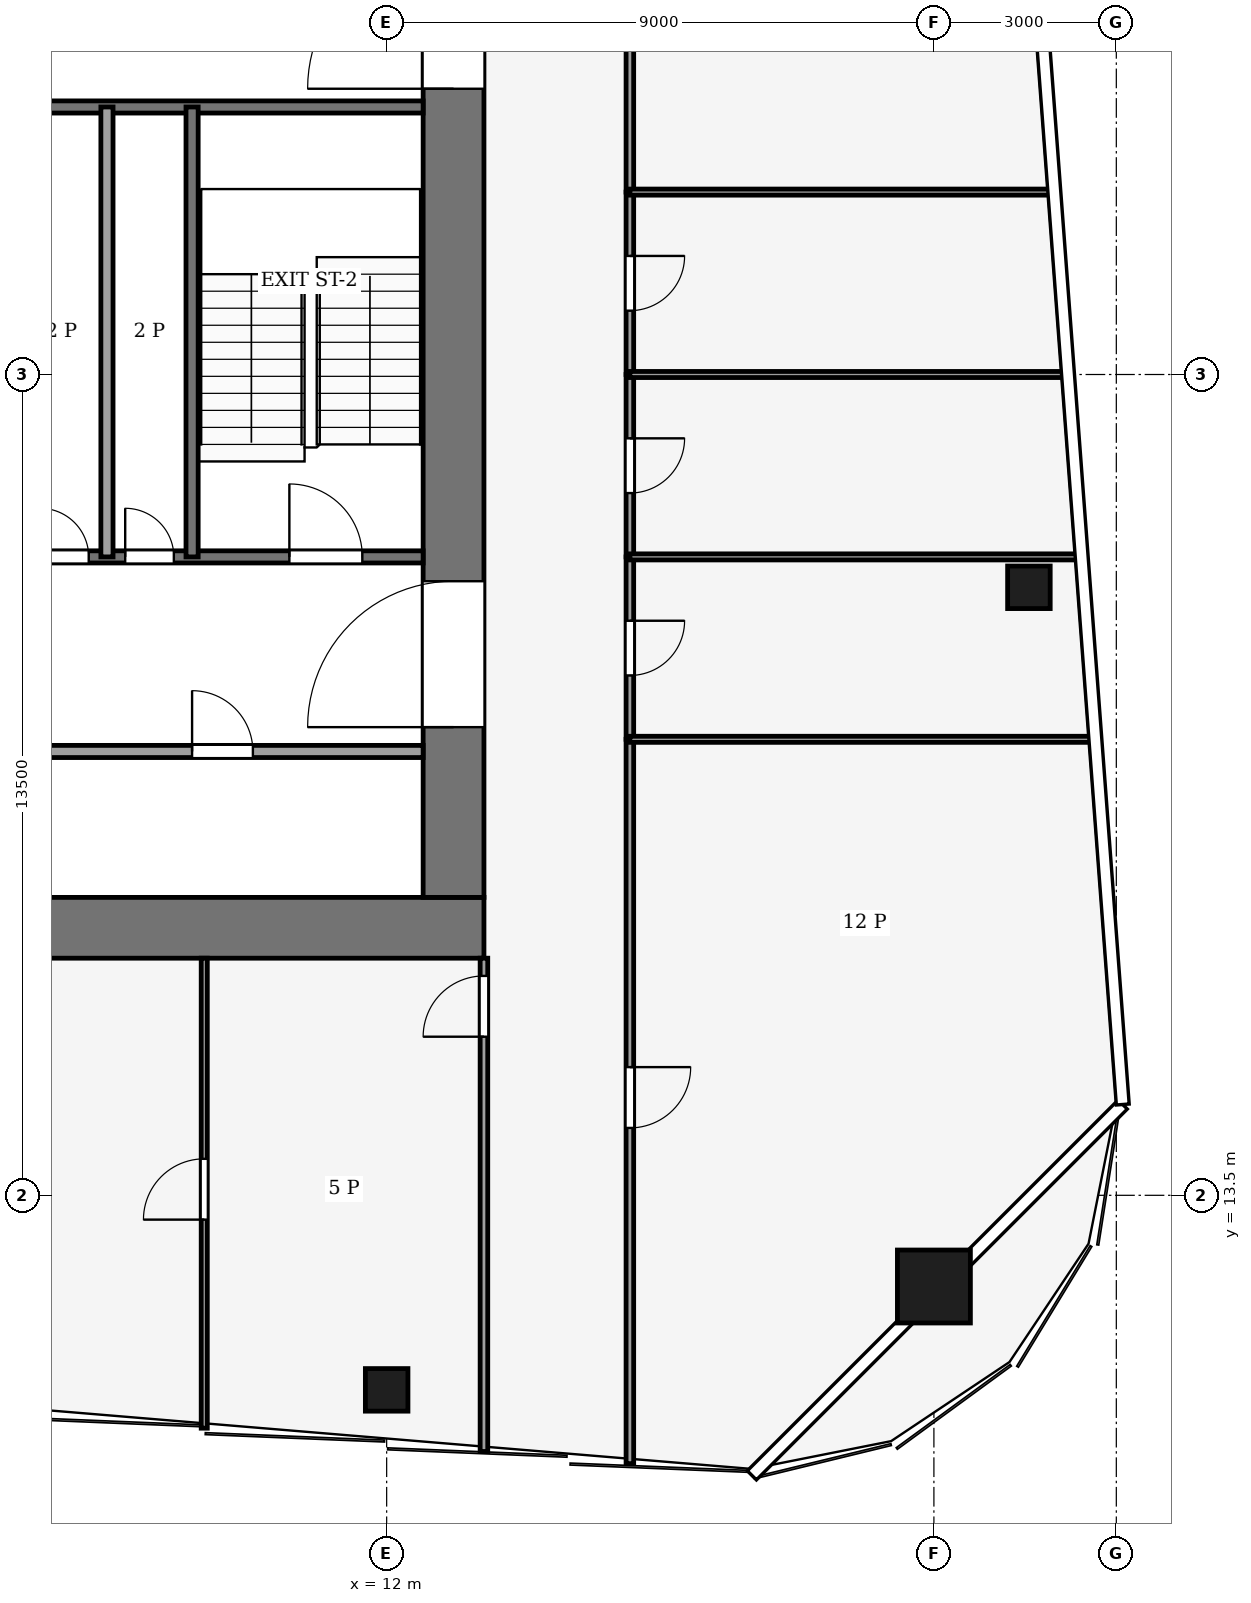
"""IFC4 building model, lengths in metres.
Left out: names, types, materials, properties, quantities, classifications, styles, units other than length and angle.
Written with IfcOpenShell. Run it as: python <this file> out.ifc"""

import sys

from ifc_helpers import new_model, si_unit, direction, frame, frame_2d, origin, origin_2d, place, context, subcontext, project, spatial, rectangle, hollow_rectangle, extrude, element, fill, save


model = new_model("IFC4")
c1 = context("Model", 3, precision=1e-05, world=origin(), true_north=direction((0.0, 1.0)))
c2 = subcontext(c1, "Body", "Model", "MODEL_VIEW")
j1 = project(units=[si_unit("LENGTHUNIT", "METRE"), si_unit("PLANEANGLEUNIT", "RADIAN")], contexts=[c1])
p1 = place(None, origin())
s1 = spatial("IfcSite", under=j1, at=p1, CompositionType="ELEMENT")
p2 = place(p1, origin())
s2 = spatial("IfcBuilding", under=s1, at=p2, CompositionType="ELEMENT")
p3 = place(p2, frame((0.0, 0.0, 146.0)))
s3 = spatial("IfcBuildingStorey", under=s2, at=p3, CompositionType="ELEMENT", Elevation=146.0)
p4 = place(p3, frame((-13.6, 17.9, -0.13), z_axis=(0.0, 0.0, 1.0), x_axis=(1.0, 0.0, 0.0)))
e1 = element("IfcWall", 1, at=p4, inside=s3, PredefinedType="SHEAR", context=c2, shape_type="SweptSolid", body=[
    extrude(rectangle(XDim=27.2, YDim=1.0, at=frame_2d((13.6, 0.0))), origin(), (0.0, 0.0, 1.0), 4.0),
])
p5 = place(p3, frame((13.1, 18.4, -0.13), z_axis=(0.0, 0.0, 1.0), x_axis=(0.0, 1.0, 0.0)))
e2 = element("IfcWall", 2, at=p5, inside=s3, PredefinedType="SHEAR", context=c2, shape_type="SweptSolid", body=[
    extrude(rectangle(XDim=19.2, YDim=1.0, at=frame_2d((9.6, 0.0))), origin(), (0.0, 0.0, 1.0), 4.0),
])
p6 = place(p5, frame((2.8, 0.0, 0.13)))
e3 = element("IfcOpeningElement", 3, at=p6, cuts=e2, PredefinedType="OPENING", context=c2, shape_type="SweptSolid", body=[
    extrude(rectangle(XDim=2.4, YDim=2.4, at=frame_2d((1.2, 1.2))), frame((0.0, 0.51, 0.0), z_axis=(0.0, -1.0, 0.0), x_axis=(1.0, 0.0, 0.0)), (0.0, 0.0, 1.0), 1.02),
])
p7 = place(p5, frame((13.3, 0.0, 0.13)))
e4 = element("IfcOpeningElement", 4, at=p7, cuts=e2, PredefinedType="OPENING", context=c2, shape_type="SweptSolid", body=[
    extrude(rectangle(XDim=2.4, YDim=2.4, at=frame_2d((1.2, 1.2))), frame((0.0, 0.51, 0.0), z_axis=(0.0, -1.0, 0.0), x_axis=(1.0, 0.0, 0.0)), (0.0, 0.0, 1.0), 1.02),
])
p8 = place(p3, frame((21.0, 12.0, 0.0), z_axis=(0.0, 0.0, 1.0), x_axis=(1.0, 0.0, 0.0)))
e5 = element("IfcColumn", 5, at=p8, inside=s3, PredefinedType="COLUMN", context=c2, shape_type="SweptSolid", body=[
    extrude(hollow_rectangle(XDim=1.2, YDim=1.2, WallThickness=0.07, at=origin_2d()), origin(), (0.0, 0.0, 1.0), 4.0),
])
for number, where, z_axis, x_axis in (
    (6, (12.0, 10.3, 0.0), (0.0, 0.0, 1.0), (1.0, 0.0, 0.0)),
    (7, (22.562, 23.5, 0.0), (0.0, 0.0, 1.0), (1.0, 0.0, 0.0)),
):
    element("IfcColumn", number, at=place(p3, frame(where, z_axis=z_axis, x_axis=x_axis)), inside=s3, PredefinedType="COLUMN", context=c2, shape_type="SweptSolid", body=[
        extrude(hollow_rectangle(XDim=0.7, YDim=0.7, WallThickness=0.03, at=origin_2d()), origin(), (0.0, 0.0, 1.0), 4.0),
    ])
p9 = place(p3, frame((6.0, 20.8, 0.0), z_axis=(0.0, 0.0, 1.0), x_axis=(1.0, 0.0, 0.0)))
e8 = element("IfcWall", 8, at=p9, inside=s3, PredefinedType="PARTITIONING", context=c2, shape_type="SweptSolid", body=[
    extrude(rectangle(XDim=6.6, YDim=0.2, at=frame_2d((3.3, 0.0))), origin(), (0.0, 0.0, 1.0), 3.87),
])
p10 = place(p9, frame((2.8, 0.0, 0.0)))
e9 = element("IfcOpeningElement", 9, at=p10, cuts=e8, PredefinedType="OPENING", context=c2, shape_type="SweptSolid", body=[
    extrude(rectangle(XDim=1.0, YDim=2.1, at=frame_2d((0.5, 1.05))), frame((0.0, 0.11, 0.0), z_axis=(0.0, -1.0, 0.0), x_axis=(1.0, 0.0, 0.0)), (0.0, 0.0, 1.0), 0.22),
])
p11 = place(p3, frame((6.0, 24.0, 0.0), z_axis=(0.0, 0.0, 1.0), x_axis=(1.0, 0.0, 0.0)))
e10 = element("IfcWall", 10, at=p11, inside=s3, PredefinedType="PARTITIONING", context=c2, shape_type="SweptSolid", body=[
    extrude(rectangle(XDim=6.6, YDim=0.2, at=frame_2d((3.3, 0.0))), origin(), (0.0, 0.0, 1.0), 3.87),
])
p12 = place(p11, frame((0.3, 0.0, 0.0)))
e11 = element("IfcOpeningElement", 11, at=p12, cuts=e10, PredefinedType="OPENING", context=c2, shape_type="SweptSolid", body=[
    extrude(rectangle(XDim=0.8, YDim=2.1, at=frame_2d((0.4, 1.05))), frame((0.0, 0.11, 0.0), z_axis=(0.0, -1.0, 0.0), x_axis=(1.0, 0.0, 0.0)), (0.0, 0.0, 1.0), 0.22),
])
p13 = place(p11, frame((1.7, 0.0, 0.0)))
e12 = element("IfcOpeningElement", 12, at=p13, cuts=e10, PredefinedType="OPENING", context=c2, shape_type="SweptSolid", body=[
    extrude(rectangle(XDim=0.8, YDim=2.1, at=frame_2d((0.4, 1.05))), frame((0.0, 0.11, 0.0), z_axis=(0.0, -1.0, 0.0), x_axis=(1.0, 0.0, 0.0)), (0.0, 0.0, 1.0), 0.22),
])
p14 = place(p11, frame((4.4, 0.0, 0.0)))
e13 = element("IfcOpeningElement", 13, at=p14, cuts=e10, PredefinedType="OPENING", context=c2, shape_type="SweptSolid", body=[
    extrude(rectangle(XDim=1.2, YDim=2.2, at=frame_2d((0.6, 1.1))), frame((0.0, 0.11, 0.0), z_axis=(0.0, -1.0, 0.0), x_axis=(1.0, 0.0, 0.0)), (0.0, 0.0, 1.0), 0.22),
])
p15 = place(p3, frame((6.0, 31.4, 0.0), z_axis=(0.0, 0.0, 1.0), x_axis=(1.0, 0.0, 0.0)))
e14 = element("IfcWall", 14, at=p15, inside=s3, PredefinedType="PARTITIONING", context=c2, shape_type="SweptSolid", body=[
    extrude(rectangle(XDim=6.6, YDim=0.2, at=frame_2d((3.3, 0.0))), origin(), (0.0, 0.0, 1.0), 3.87),
])
for number, where, z_axis, x_axis in (
    (15, (7.4, 24.0, 0.0), (0.0, 0.0, 1.0), (0.0, 1.0, 0.0)),
    (16, (8.8, 24.0, 0.0), (0.0, 0.0, 1.0), (0.0, 1.0, 0.0)),
):
    element("IfcWall", number, at=place(p3, frame(where, z_axis=z_axis, x_axis=x_axis)), inside=s3, PredefinedType="PARTITIONING", context=c2, shape_type="SweptSolid", body=[
        extrude(rectangle(XDim=7.4, YDim=0.2, at=frame_2d((3.7, 0.0))), origin(), (0.0, 0.0, 1.0), 3.87),
    ])
p16 = place(p3, frame((16.0, 21.0, 0.0), z_axis=(0.0, 0.0, 1.0), x_axis=(0.0, -1.0, 0.0)))
e17 = element("IfcWall", 17, at=p16, inside=s3, PredefinedType="PARTITIONING", context=c2, shape_type="SweptSolid", body=[
    extrude(rectangle(XDim=11.913, YDim=0.125, at=frame_2d((5.957, 0.0))), origin(), (0.0, 0.0, 1.0), 3.04),
])
p17 = place(p16, frame((5.392, 0.0, 0.0)))
e18 = element("IfcOpeningElement", 18, at=p17, cuts=e17, PredefinedType="OPENING", context=c2, shape_type="SweptSolid", body=[
    extrude(rectangle(XDim=1.0, YDim=2.1, at=frame_2d((0.5, 1.05))), frame((0.0, 0.073, 0.0), z_axis=(0.0, -1.0, 0.0), x_axis=(1.0, 0.0, 0.0)), (0.0, 0.0, 1.0), 0.145),
])
p18 = place(p3, frame((16.0, 24.0, 0.0), z_axis=(0.0, 0.0, 1.0), x_axis=(0.0, -1.0, 0.0)))
e19 = element("IfcWall", 19, at=p18, inside=s3, PredefinedType="PARTITIONING", context=c2, shape_type="SweptSolid", body=[
    extrude(rectangle(XDim=3.0, YDim=0.125, at=frame_2d((1.5, 0.0))), origin(), (0.0, 0.0, 1.0), 3.48),
])
p19 = place(p18, frame((1.05, 0.0, 0.0)))
e20 = element("IfcOpeningElement", 20, at=p19, cuts=e19, PredefinedType="OPENING", context=c2, shape_type="SweptSolid", body=[
    extrude(rectangle(XDim=0.9, YDim=2.1, at=frame_2d((0.45, 1.05))), frame((0.0, 0.073, 0.0), z_axis=(0.0, -1.0, 0.0), x_axis=(1.0, 0.0, 0.0)), (0.0, 0.0, 1.0), 0.145),
])
p20 = place(p3, frame((16.0, 27.0, 0.0), z_axis=(0.0, 0.0, 1.0), x_axis=(0.0, -1.0, 0.0)))
e21 = element("IfcWall", 21, at=p20, inside=s3, PredefinedType="PARTITIONING", context=c2, shape_type="SweptSolid", body=[
    extrude(rectangle(XDim=3.0, YDim=0.125, at=frame_2d((1.5, 0.0))), origin(), (0.0, 0.0, 1.0), 3.87),
])
p21 = place(p20, frame((1.05, 0.0, 0.0)))
e22 = element("IfcOpeningElement", 22, at=p21, cuts=e21, PredefinedType="OPENING", context=c2, shape_type="SweptSolid", body=[
    extrude(rectangle(XDim=0.9, YDim=2.1, at=frame_2d((0.45, 1.05))), frame((0.0, 0.073, 0.0), z_axis=(0.0, -1.0, 0.0), x_axis=(1.0, 0.0, 0.0)), (0.0, 0.0, 1.0), 0.145),
])
p22 = place(p3, frame((16.0, 30.0, 0.0), z_axis=(0.0, 0.0, 1.0), x_axis=(0.0, -1.0, 0.0)))
e23 = element("IfcWall", 23, at=p22, inside=s3, PredefinedType="PARTITIONING", context=c2, shape_type="SweptSolid", body=[
    extrude(rectangle(XDim=3.0, YDim=0.125, at=frame_2d((1.5, 0.0))), origin(), (0.0, 0.0, 1.0), 3.48),
])
p23 = place(p22, frame((1.05, 0.0, 0.0)))
e24 = element("IfcOpeningElement", 24, at=p23, cuts=e23, PredefinedType="OPENING", context=c2, shape_type="SweptSolid", body=[
    extrude(rectangle(XDim=0.9, YDim=2.1, at=frame_2d((0.45, 1.05))), frame((0.0, 0.073, 0.0), z_axis=(0.0, -1.0, 0.0), x_axis=(1.0, 0.0, 0.0)), (0.0, 0.0, 1.0), 0.145),
])
p24 = place(p3, frame((16.0, 41.004, 0.0), z_axis=(0.0, 0.0, 1.0), x_axis=(0.0, -1.0, 0.0)))
e25 = element("IfcWall", 25, at=p24, inside=s3, PredefinedType="PARTITIONING", context=c2, shape_type="SweptSolid", body=[
    extrude(rectangle(XDim=11.004, YDim=0.125, at=frame_2d((5.502, 0.0))), origin(), (0.0, 0.0, 1.0), 3.14),
])
p25 = place(p24, frame((5.002, 0.0, 0.0)))
e26 = element("IfcOpeningElement", 26, at=p25, cuts=e25, PredefinedType="OPENING", context=c2, shape_type="SweptSolid", body=[
    extrude(rectangle(XDim=1.0, YDim=2.1, at=frame_2d((0.5, 1.05))), frame((0.0, 0.073, 0.0), z_axis=(0.0, -1.0, 0.0), x_axis=(1.0, 0.0, 0.0)), (0.0, 0.0, 1.0), 0.145),
])
p26 = place(p3, frame((13.6, 9.287, 0.0), z_axis=(0.0, 0.0, 1.0), x_axis=(0.0, 1.0, 0.0)))
e27 = element("IfcWall", 27, at=p26, inside=s3, PredefinedType="PARTITIONING", context=c2, shape_type="SweptSolid", body=[
    extrude(rectangle(XDim=8.113, YDim=0.125, at=frame_2d((4.057, 0.0))), origin(), (0.0, 0.0, 1.0), 3.04),
])
p27 = place(p26, frame((6.822, 0.0, 0.0)))
e28 = element("IfcOpeningElement", 28, at=p27, cuts=e27, PredefinedType="OPENING", context=c2, shape_type="SweptSolid", body=[
    extrude(rectangle(XDim=1.0, YDim=2.1, at=frame_2d((0.5, 1.05))), frame((0.0, 0.073, 0.0), z_axis=(0.0, -1.0, 0.0), x_axis=(1.0, 0.0, 0.0)), (0.0, 0.0, 1.0), 0.145),
])
p28 = place(p3, frame((23.63, 21.0, 0.0), z_axis=(0.0, 0.0, 1.0), x_axis=(-1.0, 0.0, 0.0)))
e29 = element("IfcWall", 29, at=p28, inside=s3, PredefinedType="PARTITIONING", context=c2, shape_type="SweptSolid", body=[
    extrude(rectangle(XDim=7.63, YDim=0.1, at=frame_2d((3.815, 0.0))), origin(), (0.0, 0.0, 1.0), 3.04),
])
p29 = place(p3, frame((23.405, 24.0, 0.0), z_axis=(0.0, 0.0, 1.0), x_axis=(-1.0, 0.0, 0.0)))
e30 = element("IfcWall", 30, at=p29, inside=s3, PredefinedType="PARTITIONING", context=c2, shape_type="SweptSolid", body=[
    extrude(rectangle(XDim=7.405, YDim=0.1, at=frame_2d((3.703, 0.0))), origin(), (0.0, 0.0, 1.0), 3.04),
])
p30 = place(p3, frame((23.18, 27.0, 0.0), z_axis=(0.0, 0.0, 1.0), x_axis=(-1.0, 0.0, 0.0)))
e31 = element("IfcWall", 31, at=p30, inside=s3, PredefinedType="PARTITIONING", context=c2, shape_type="SweptSolid", body=[
    extrude(rectangle(XDim=7.18, YDim=0.1, at=frame_2d((3.59, 0.0))), origin(), (0.0, 0.0, 1.0), 3.04),
])
p31 = place(p3, frame((22.955, 30.0, 0.0), z_axis=(0.0, 0.0, 1.0), x_axis=(-1.0, 0.0, 0.0)))
e32 = element("IfcWall", 32, at=p31, inside=s3, PredefinedType="PARTITIONING", context=c2, shape_type="SweptSolid", body=[
    extrude(rectangle(XDim=6.955, YDim=0.1, at=frame_2d((3.478, 0.0))), origin(), (0.0, 0.0, 1.0), 3.04),
])
p32 = place(p3, frame((9.0, 9.67, 0.0), z_axis=(0.0, 0.0, 1.0), x_axis=(0.0, 1.0, 0.0)))
e33 = element("IfcWall", 33, at=p32, inside=s3, PredefinedType="PARTITIONING", context=c2, shape_type="SweptSolid", body=[
    extrude(rectangle(XDim=7.73, YDim=0.1, at=frame_2d((3.865, 0.0))), origin(), (0.0, 0.0, 1.0), 3.04),
])
p33 = place(p32, frame((3.43, 0.0, 0.0)))
e34 = element("IfcOpeningElement", 34, at=p33, cuts=e33, PredefinedType="OPENING", context=c2, shape_type="SweptSolid", body=[
    extrude(rectangle(XDim=1.0, YDim=2.1, at=frame_2d((0.5, 1.05))), frame((0.0, 0.06, 0.0), z_axis=(0.0, -1.0, 0.0), x_axis=(1.0, 0.0, 0.0)), (0.0, 0.0, 1.0), 0.12),
])
p34 = place(p10, origin())
e35 = element("IfcDoor", 35, at=p34, inside=s3, OperationType="SINGLE_SWING_LEFT", PredefinedType="DOOR", context=c2, shape_type="SweptSolid", body=[
    extrude(rectangle(XDim=1.0, YDim=2.1, at=frame_2d((0.5, 1.05))), frame((0.0, 0.025, 0.0), z_axis=(0.0, -1.0, 0.0), x_axis=(1.0, 0.0, 0.0)), (0.0, 0.0, 1.0), 0.05),
])
fill(e9, e35)
p35 = place(p12, origin())
e36 = element("IfcDoor", 36, at=p35, inside=s3, OperationType="SINGLE_SWING_RIGHT", PredefinedType="DOOR", context=c2, shape_type="SweptSolid", body=[
    extrude(rectangle(XDim=0.8, YDim=2.1, at=frame_2d((0.4, 1.05))), frame((0.0, 0.025, 0.0), z_axis=(0.0, -1.0, 0.0), x_axis=(1.0, 0.0, 0.0)), (0.0, 0.0, 1.0), 0.05),
])
fill(e11, e36)
p36 = place(p13, origin())
e37 = element("IfcDoor", 37, at=p36, inside=s3, OperationType="SINGLE_SWING_LEFT", PredefinedType="DOOR", context=c2, shape_type="SweptSolid", body=[
    extrude(rectangle(XDim=0.8, YDim=2.1, at=frame_2d((0.4, 1.05))), frame((0.0, 0.025, 0.0), z_axis=(0.0, -1.0, 0.0), x_axis=(1.0, 0.0, 0.0)), (0.0, 0.0, 1.0), 0.05),
])
fill(e12, e37)
p37 = place(p14, origin())
e38 = element("IfcDoor", 38, at=p37, inside=s3, OperationType="SINGLE_SWING_LEFT", PredefinedType="DOOR", context=c2, shape_type="SweptSolid", body=[
    extrude(rectangle(XDim=1.2, YDim=2.2, at=frame_2d((0.6, 1.1))), frame((0.0, 0.025, 0.0), z_axis=(0.0, -1.0, 0.0), x_axis=(1.0, 0.0, 0.0)), (0.0, 0.0, 1.0), 0.05),
])
fill(e13, e38)
p38 = place(p6, origin())
e39 = element("IfcDoor", 39, at=p38, inside=s3, OperationType="DOUBLE_DOOR_SINGLE_SWING", PredefinedType="DOOR", context=c2, shape_type="SweptSolid", body=[
    extrude(rectangle(XDim=2.4, YDim=2.4, at=frame_2d((1.2, 1.2))), frame((0.0, 0.025, 0.0), z_axis=(0.0, -1.0, 0.0), x_axis=(1.0, 0.0, 0.0)), (0.0, 0.0, 1.0), 0.05),
])
fill(e3, e39)
p39 = place(p7, origin())
e40 = element("IfcDoor", 40, at=p39, inside=s3, OperationType="DOUBLE_DOOR_SINGLE_SWING", PredefinedType="DOOR", context=c2, shape_type="SweptSolid", body=[
    extrude(rectangle(XDim=2.4, YDim=2.4, at=frame_2d((1.2, 1.2))), frame((0.0, 0.025, 0.0), z_axis=(0.0, -1.0, 0.0), x_axis=(1.0, 0.0, 0.0)), (0.0, 0.0, 1.0), 0.05),
])
fill(e4, e40)
p40 = place(p17, origin())
e41 = element("IfcDoor", 41, at=p40, inside=s3, OperationType="SINGLE_SWING_LEFT", PredefinedType="DOOR", context=c2, shape_type="SweptSolid", body=[
    extrude(rectangle(XDim=1.0, YDim=2.1, at=frame_2d((0.5, 1.05))), frame((0.0, 0.025, 0.0), z_axis=(0.0, -1.0, 0.0), x_axis=(1.0, 0.0, 0.0)), (0.0, 0.0, 1.0), 0.05),
])
fill(e18, e41)
p41 = place(p19, origin())
e42 = element("IfcDoor", 42, at=p41, inside=s3, OperationType="SINGLE_SWING_LEFT", PredefinedType="DOOR", context=c2, shape_type="SweptSolid", body=[
    extrude(rectangle(XDim=0.9, YDim=2.1, at=frame_2d((0.45, 1.05))), frame((0.0, 0.025, 0.0), z_axis=(0.0, -1.0, 0.0), x_axis=(1.0, 0.0, 0.0)), (0.0, 0.0, 1.0), 0.05),
])
fill(e20, e42)
p42 = place(p21, origin())
e43 = element("IfcDoor", 43, at=p42, inside=s3, OperationType="SINGLE_SWING_RIGHT", PredefinedType="DOOR", context=c2, shape_type="SweptSolid", body=[
    extrude(rectangle(XDim=0.9, YDim=2.1, at=frame_2d((0.45, 1.05))), frame((0.0, 0.025, 0.0), z_axis=(0.0, -1.0, 0.0), x_axis=(1.0, 0.0, 0.0)), (0.0, 0.0, 1.0), 0.05),
])
fill(e22, e43)
p43 = place(p23, origin())
e44 = element("IfcDoor", 44, at=p43, inside=s3, OperationType="SINGLE_SWING_LEFT", PredefinedType="DOOR", context=c2, shape_type="SweptSolid", body=[
    extrude(rectangle(XDim=0.9, YDim=2.1, at=frame_2d((0.45, 1.05))), frame((0.0, 0.025, 0.0), z_axis=(0.0, -1.0, 0.0), x_axis=(1.0, 0.0, 0.0)), (0.0, 0.0, 1.0), 0.05),
])
fill(e24, e44)
p44 = place(p27, origin())
e45 = element("IfcDoor", 45, at=p44, inside=s3, OperationType="SINGLE_SWING_RIGHT", PredefinedType="DOOR", context=c2, shape_type="SweptSolid", body=[
    extrude(rectangle(XDim=1.0, YDim=2.1, at=frame_2d((0.5, 1.05))), frame((0.0, 0.025, 0.0), z_axis=(0.0, -1.0, 0.0), x_axis=(1.0, 0.0, 0.0)), (0.0, 0.0, 1.0), 0.05),
])
fill(e28, e45)
p45 = place(p33, origin())
e46 = element("IfcDoor", 46, at=p45, inside=s3, OperationType="SINGLE_SWING_RIGHT", PredefinedType="DOOR", context=c2, shape_type="SweptSolid", body=[
    extrude(rectangle(XDim=1.0, YDim=2.1, at=frame_2d((0.5, 1.05))), frame((0.0, 0.025, 0.0), z_axis=(0.0, -1.0, 0.0), x_axis=(1.0, 0.0, 0.0)), (0.0, 0.0, 1.0), 0.05),
])
fill(e34, e46)
save(model, sys.argv[1])
